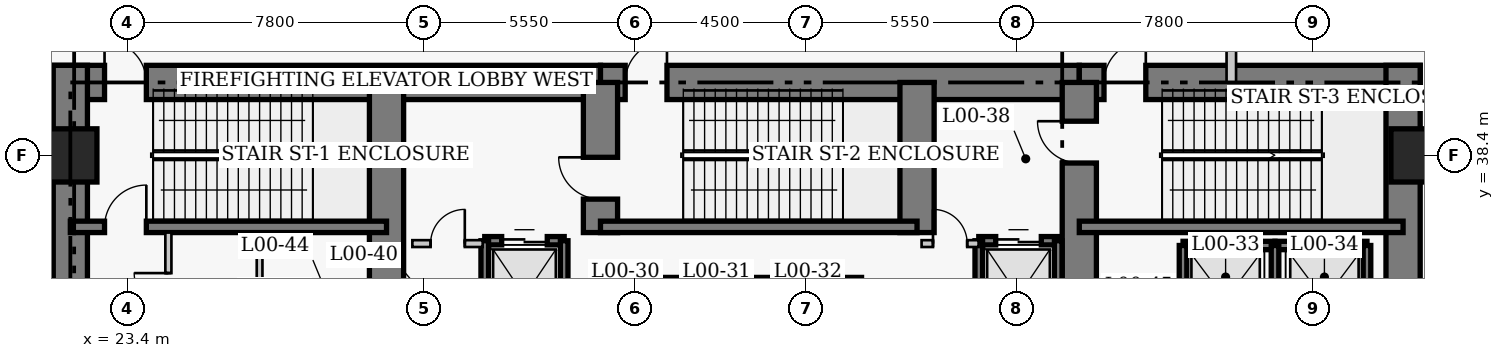
"""IFC4 building model, lengths in metres.
Left out: names, types, materials, properties, quantities, classifications, styles, units other than length and angle.
Written with IfcOpenShell. Run it as: python <this file> out.ifc"""

import sys

from ifc_helpers import new_model, si_unit, direction, frame, frame_2d, origin, origin_2d, place, context, subcontext, project, spatial, rectangle, extrude, element, fill, save


model = new_model("IFC4")
c1 = context("Model", 3, precision=1e-05, world=origin(), true_north=direction((0.0, 1.0)))
c2 = subcontext(c1, "Body", "Model", "MODEL_VIEW")
j1 = project(units=[si_unit("LENGTHUNIT", "METRE"), si_unit("PLANEANGLEUNIT", "RADIAN")], contexts=[c1])
p1 = place(None, origin())
s1 = spatial("IfcSite", under=j1, at=p1, CompositionType="ELEMENT")
p2 = place(p1, origin())
s2 = spatial("IfcBuilding", under=s1, at=p2, CompositionType="ELEMENT")
p3 = place(p2, origin())
s3 = spatial("IfcBuildingStorey", under=s2, at=p3, CompositionType="ELEMENT", Elevation=0.0)
p4 = place(p3, frame((21.45, 40.32, 0.0), z_axis=(0.0, 0.0, 1.0), x_axis=(1.0, 0.0, 0.0)))
e1 = element("IfcWall", 1, at=p4, inside=s3, PredefinedType="SHEAR", context=c2, shape_type="SweptSolid", body=[
    extrude(rectangle(XDim=14.4, YDim=0.9, at=frame_2d((7.2, 0.0))), origin(), (0.0, 0.0, 1.0), 5.4),
])
p5 = place(p4, frame((1.35, 0.0, 0.0)))
e2 = element("IfcOpeningElement", 2, at=p5, cuts=e1, PredefinedType="OPENING", context=c2, shape_type="SweptSolid", body=[
    extrude(rectangle(XDim=1.1, YDim=2.15, at=frame_2d((0.55, 1.075))), frame((0.0, 0.46, 0.0), z_axis=(0.0, -1.0, 0.0), x_axis=(1.0, 0.0, 0.0)), (0.0, 0.0, 1.0), 0.92),
])
p6 = place(p3, frame((35.85, 40.32, 0.0), z_axis=(0.0, 0.0, 1.0), x_axis=(1.0, 0.0, 0.0)))
e3 = element("IfcWall", 3, at=p6, inside=s3, PredefinedType="SHEAR", context=c2, shape_type="SweptSolid", body=[
    extrude(rectangle(XDim=12.6, YDim=0.9, at=frame_2d((6.3, 0.0))), origin(), (0.0, 0.0, 1.0), 5.4),
])
p7 = place(p6, frame((0.65, 0.0, 0.0)))
e4 = element("IfcOpeningElement", 4, at=p7, cuts=e3, PredefinedType="OPENING", context=c2, shape_type="SweptSolid", body=[
    extrude(rectangle(XDim=1.1, YDim=2.15, at=frame_2d((0.55, 1.075))), frame((0.0, 0.46, 0.0), z_axis=(0.0, -1.0, 0.0), x_axis=(1.0, 0.0, 0.0)), (0.0, 0.0, 1.0), 0.92),
])
p8 = place(p3, frame((48.45, 40.32, 0.0), z_axis=(0.0, 0.0, 1.0), x_axis=(1.0, 0.0, 0.0)))
e5 = element("IfcWall", 5, at=p8, inside=s3, PredefinedType="SHEAR", context=c2, shape_type="SweptSolid", body=[
    extrude(rectangle(XDim=8.97, YDim=0.9, at=frame_2d((4.485, 0.0))), origin(), (0.0, 0.0, 1.0), 5.4),
])
p9 = place(p8, frame((0.65, 0.0, 0.0)))
e6 = element("IfcOpeningElement", 6, at=p9, cuts=e5, PredefinedType="OPENING", context=c2, shape_type="SweptSolid", body=[
    extrude(rectangle(XDim=1.1, YDim=2.15, at=frame_2d((0.55, 1.075))), frame((0.0, 0.46, 0.0), z_axis=(0.0, -1.0, 0.0), x_axis=(1.0, 0.0, 0.0)), (0.0, 0.0, 1.0), 0.92),
])
for number, where, z_axis, x_axis in (
    (7, (21.9, 27.05, 0.0), (0.0, 0.0, 1.0), (0.0, 1.0, 0.0)),
    (8, (56.97, 27.05, 0.0), (0.0, 0.0, 1.0), (0.0, 1.0, 0.0)),
):
    element("IfcWall", number, at=place(p3, frame(where, z_axis=z_axis, x_axis=x_axis)), inside=s3, PredefinedType="SHEAR", context=c2, shape_type="SweptSolid", body=[
        extrude(rectangle(XDim=13.72, YDim=0.9, at=frame_2d((6.86, 0.0))), origin(), (0.0, 0.0, 1.0), 5.4),
    ])
p10 = place(p3, frame((30.22, 33.2, 0.0), z_axis=(0.0, 0.0, 1.0), x_axis=(0.0, 1.0, 0.0)))
e9 = element("IfcWall", 9, at=p10, inside=s3, PredefinedType="SHEAR", context=c2, shape_type="SweptSolid", body=[
    extrude(rectangle(XDim=7.12, YDim=0.9, at=frame_2d((3.56, 0.0))), origin(), (0.0, 0.0, 1.0), 5.4),
])
p11 = place(p3, frame((35.85, 36.37, 0.0), z_axis=(0.0, 0.0, 1.0), x_axis=(0.0, 1.0, 0.0)))
e10 = element("IfcWall", 10, at=p11, inside=s3, PredefinedType="SHEAR", context=c2, shape_type="SweptSolid", body=[
    extrude(rectangle(XDim=3.95, YDim=0.9, at=frame_2d((1.975, 0.0))), origin(), (0.0, 0.0, 1.0), 5.4),
])
p12 = place(p11, frame((0.88, 0.0, 0.0)))
e11 = element("IfcOpeningElement", 11, at=p12, cuts=e10, PredefinedType="OPENING", context=c2, shape_type="SweptSolid", body=[
    extrude(rectangle(XDim=1.1, YDim=2.15, at=frame_2d((0.55, 1.075))), frame((0.0, 0.46, 0.0), z_axis=(0.0, -1.0, 0.0), x_axis=(1.0, 0.0, 0.0)), (0.0, 0.0, 1.0), 0.92),
])
p13 = place(p3, frame((44.18, 36.37, 0.0), z_axis=(0.0, 0.0, 1.0), x_axis=(0.0, 1.0, 0.0)))
e12 = element("IfcWall", 12, at=p13, inside=s3, PredefinedType="SHEAR", context=c2, shape_type="SweptSolid", body=[
    extrude(rectangle(XDim=3.95, YDim=0.9, at=frame_2d((1.975, 0.0))), origin(), (0.0, 0.0, 1.0), 5.4),
])
p14 = place(p3, frame((48.45, 32.3, 0.0), z_axis=(0.0, 0.0, 1.0), x_axis=(0.0, 1.0, 0.0)))
e13 = element("IfcWall", 13, at=p14, inside=s3, PredefinedType="SHEAR", context=c2, shape_type="SweptSolid", body=[
    extrude(rectangle(XDim=8.02, YDim=0.9, at=frame_2d((4.01, 0.0))), origin(), (0.0, 0.0, 1.0), 5.4),
])
p15 = place(p14, frame((5.9, 0.0, 0.0)))
e14 = element("IfcOpeningElement", 14, at=p15, cuts=e13, PredefinedType="OPENING", context=c2, shape_type="SweptSolid", body=[
    extrude(rectangle(XDim=1.1, YDim=2.15, at=frame_2d((0.55, 1.075))), frame((0.0, 0.46, 0.0), z_axis=(0.0, -1.0, 0.0), x_axis=(1.0, 0.0, 0.0)), (0.0, 0.0, 1.0), 0.92),
])
p16 = place(p3, frame((21.9, 36.52, 0.0), z_axis=(0.0, 0.0, 1.0), x_axis=(1.0, 0.0, 0.0)))
e15 = element("IfcWall", 15, at=p16, inside=s3, PredefinedType="SHEAR", context=c2, shape_type="SweptSolid", body=[
    extrude(rectangle(XDim=8.32, YDim=0.3, at=frame_2d((4.16, 0.0))), origin(), (0.0, 0.0, 1.0), 5.4),
])
p17 = place(p16, frame((0.9, 0.0, 0.0)))
e16 = element("IfcOpeningElement", 16, at=p17, cuts=e15, PredefinedType="OPENING", context=c2, shape_type="SweptSolid", body=[
    extrude(rectangle(XDim=1.1, YDim=2.15, at=frame_2d((0.55, 1.075))), frame((0.0, 0.16, 0.0), z_axis=(0.0, -1.0, 0.0), x_axis=(1.0, 0.0, 0.0)), (0.0, 0.0, 1.0), 0.32),
])
p18 = place(p3, frame((35.85, 36.52, 0.0), z_axis=(0.0, 0.0, 1.0), x_axis=(1.0, 0.0, 0.0)))
e17 = element("IfcWall", 17, at=p18, inside=s3, PredefinedType="SHEAR", context=c2, shape_type="SweptSolid", body=[
    extrude(rectangle(XDim=8.33, YDim=0.3, at=frame_2d((4.165, 0.0))), origin(), (0.0, 0.0, 1.0), 5.4),
])
p19 = place(p3, frame((48.45, 36.52, 0.0), z_axis=(0.0, 0.0, 1.0), x_axis=(1.0, 0.0, 0.0)))
e18 = element("IfcWall", 18, at=p19, inside=s3, PredefinedType="SHEAR", context=c2, shape_type="SweptSolid", body=[
    extrude(rectangle(XDim=8.52, YDim=0.3, at=frame_2d((4.26, 0.0))), origin(), (0.0, 0.0, 1.0), 5.4),
])
for number, where, z_axis, x_axis in (
    (19, (21.9, 38.4, 0.0), (0.0, 0.0, 1.0), (1.0, 0.0, 0.0)),
    (20, (57.35, 38.4, 0.0), (0.0, 0.0, 1.0), (1.0, 0.0, 0.0)),
):
    element("IfcColumn", number, at=place(p3, frame(where, z_axis=z_axis, x_axis=x_axis)), inside=s3, PredefinedType="COLUMN", context=c2, shape_type="SweptSolid", body=[
        extrude(rectangle(XDim=1.4, YDim=1.4, at=origin_2d()), origin(), (0.0, 0.0, 1.0), 5.4),
    ])
p20 = place(p3, frame((35.68, 35.08, 0.0), z_axis=(0.0, 0.0, 1.0), x_axis=(1.0, 0.0, 0.0)))
e21 = element("IfcWall", 21, at=p20, inside=s3, PredefinedType="SHEAR", context=c2, shape_type="SweptSolid", body=[
    extrude(rectangle(XDim=2.32, YDim=0.22, at=frame_2d((1.16, 0.0))), origin(), (0.0, 0.0, 1.0), 5.4),
])
p21 = place(p3, frame((38.0, 35.08, 0.0), z_axis=(0.0, 0.0, 1.0), x_axis=(1.0, 0.0, 0.0)))
e22 = element("IfcWall", 22, at=p21, inside=s3, PredefinedType="SHEAR", context=c2, shape_type="SweptSolid", body=[
    extrude(rectangle(XDim=2.4, YDim=0.22, at=frame_2d((1.2, 0.0))), origin(), (0.0, 0.0, 1.0), 5.4),
])
p22 = place(p3, frame((40.4, 35.08, 0.0), z_axis=(0.0, 0.0, 1.0), x_axis=(1.0, 0.0, 0.0)))
e23 = element("IfcWall", 23, at=p22, inside=s3, PredefinedType="SHEAR", context=c2, shape_type="SweptSolid", body=[
    extrude(rectangle(XDim=2.32, YDim=0.22, at=frame_2d((1.16, 0.0))), origin(), (0.0, 0.0, 1.0), 5.4),
])
p23 = place(p3, frame((51.18, 36.03, 0.0), z_axis=(0.0, 0.0, 1.0), x_axis=(1.0, 0.0, 0.0)))
e24 = element("IfcWall", 24, at=p23, inside=s3, PredefinedType="SHEAR", context=c2, shape_type="SweptSolid", body=[
    extrude(rectangle(XDim=2.42, YDim=0.22, at=frame_2d((1.21, 0.0))), origin(), (0.0, 0.0, 1.0), 5.4),
])
p24 = place(p3, frame((51.18, 33.17, 0.0), z_axis=(0.0, 0.0, 1.0), x_axis=(0.0, 1.0, 0.0)))
e25 = element("IfcWall", 25, at=p24, inside=s3, PredefinedType="SHEAR", context=c2, shape_type="SweptSolid", body=[
    extrude(rectangle(XDim=2.86, YDim=0.2, at=frame_2d((1.43, 0.0))), origin(), (0.0, 0.0, 1.0), 5.4),
])
p25 = place(p3, frame((53.6, 36.03, 0.0), z_axis=(0.0, 0.0, 1.0), x_axis=(1.0, 0.0, 0.0)))
e26 = element("IfcWall", 26, at=p25, inside=s3, PredefinedType="SHEAR", context=c2, shape_type="SweptSolid", body=[
    extrude(rectangle(XDim=2.42, YDim=0.22, at=frame_2d((1.21, 0.0))), origin(), (0.0, 0.0, 1.0), 5.4),
])
for number, where, z_axis, x_axis in (
    (27, (53.6, 33.17, 0.0), (0.0, 0.0, 1.0), (0.0, 1.0, 0.0)),
    (28, (56.02, 33.17, 0.0), (0.0, 0.0, 1.0), (0.0, 1.0, 0.0)),
):
    element("IfcWall", number, at=place(p3, frame(where, z_axis=z_axis, x_axis=x_axis)), inside=s3, PredefinedType="SHEAR", context=c2, shape_type="SweptSolid", body=[
        extrude(rectangle(XDim=2.86, YDim=0.2, at=frame_2d((1.43, 0.0))), origin(), (0.0, 0.0, 1.0), 5.4),
    ])
p26 = place(p3, frame((32.805, 36.155, 0.0), z_axis=(0.0, 0.0, 1.0), x_axis=(1.0, 0.0, 0.0)))
e29 = element("IfcWall", 29, at=p26, inside=s3, PredefinedType="SHEAR", context=c2, shape_type="SweptSolid", body=[
    extrude(rectangle(XDim=2.09, YDim=0.22, at=frame_2d((1.045, 0.0))), origin(), (0.0, 0.0, 1.0), 5.4),
])
p27 = place(p26, frame((0.445, 0.0, 0.0)))
e30 = element("IfcOpeningElement", 30, at=p27, cuts=e29, PredefinedType="OPENING", context=c2, shape_type="SweptSolid", body=[
    extrude(rectangle(XDim=1.2, YDim=2.15, at=frame_2d((0.6, 1.075))), frame((0.0, 0.12, 0.0), z_axis=(0.0, -1.0, 0.0), x_axis=(1.0, 0.0, 0.0)), (0.0, 0.0, 1.0), 0.24),
])
for number, where, z_axis, x_axis in (
    (31, (32.805, 33.245, 0.0), (0.0, 0.0, 1.0), (0.0, 1.0, 0.0)),
    (32, (34.895, 33.245, 0.0), (0.0, 0.0, 1.0), (0.0, 1.0, 0.0)),
):
    element("IfcWall", number, at=place(p3, frame(where, z_axis=z_axis, x_axis=x_axis)), inside=s3, PredefinedType="SHEAR", context=c2, shape_type="SweptSolid", body=[
        extrude(rectangle(XDim=2.91, YDim=0.2, at=frame_2d((1.455, 0.0))), origin(), (0.0, 0.0, 1.0), 5.4),
    ])
p28 = place(p3, frame((45.805, 36.155, 0.0), z_axis=(0.0, 0.0, 1.0), x_axis=(1.0, 0.0, 0.0)))
e33 = element("IfcWall", 33, at=p28, inside=s3, PredefinedType="SHEAR", context=c2, shape_type="SweptSolid", body=[
    extrude(rectangle(XDim=2.09, YDim=0.22, at=frame_2d((1.045, 0.0))), origin(), (0.0, 0.0, 1.0), 5.4),
])
p29 = place(p28, frame((0.445, 0.0, 0.0)))
e34 = element("IfcOpeningElement", 34, at=p29, cuts=e33, PredefinedType="OPENING", context=c2, shape_type="SweptSolid", body=[
    extrude(rectangle(XDim=1.2, YDim=2.15, at=frame_2d((0.6, 1.075))), frame((0.0, 0.12, 0.0), z_axis=(0.0, -1.0, 0.0), x_axis=(1.0, 0.0, 0.0)), (0.0, 0.0, 1.0), 0.24),
])
p30 = place(p3, frame((45.805, 32.65, 0.0), z_axis=(0.0, 0.0, 1.0), x_axis=(0.0, 1.0, 0.0)))
e35 = element("IfcWall", 35, at=p30, inside=s3, PredefinedType="SHEAR", context=c2, shape_type="SweptSolid", body=[
    extrude(rectangle(XDim=3.505, YDim=0.2, at=frame_2d((1.752, 0.0))), origin(), (0.0, 0.0, 1.0), 5.4),
])
p31 = place(p3, frame((47.895, 33.245, 0.0), z_axis=(0.0, 0.0, 1.0), x_axis=(0.0, 1.0, 0.0)))
e36 = element("IfcWall", 36, at=p31, inside=s3, PredefinedType="SHEAR", context=c2, shape_type="SweptSolid", body=[
    extrude(rectangle(XDim=2.91, YDim=0.2, at=frame_2d((1.455, 0.0))), origin(), (0.0, 0.0, 1.0), 5.4),
])
p32 = place(p3, frame((30.9, 36.08, 0.0), z_axis=(0.0, 0.0, 1.0), x_axis=(1.0, 0.0, 0.0)))
e37 = element("IfcWall", 37, at=p32, inside=s3, PredefinedType="PARTITIONING", context=c2, shape_type="SweptSolid", body=[
    extrude(rectangle(XDim=1.85, YDim=0.18, at=frame_2d((0.925, 0.0))), origin(), (0.0, 0.0, 1.0), 5.1),
])
p33 = place(p32, frame((0.48, 0.0, 0.0)))
e38 = element("IfcOpeningElement", 38, at=p33, cuts=e37, PredefinedType="OPENING", context=c2, shape_type="SweptSolid", body=[
    extrude(rectangle(XDim=0.9, YDim=2.15, at=frame_2d((0.45, 1.075))), frame((0.0, 0.1, 0.0), z_axis=(0.0, -1.0, 0.0), x_axis=(1.0, 0.0, 0.0)), (0.0, 0.0, 1.0), 0.2),
])
p34 = place(p3, frame((44.3, 36.08, 0.0), z_axis=(0.0, 0.0, 1.0), x_axis=(1.0, 0.0, 0.0)))
e39 = element("IfcWall", 39, at=p34, inside=s3, PredefinedType="PARTITIONING", context=c2, shape_type="SweptSolid", body=[
    extrude(rectangle(XDim=1.5, YDim=0.18, at=frame_2d((0.75, 0.0))), origin(), (0.0, 0.0, 1.0), 5.1),
])
p35 = place(p34, frame((0.3, 0.0, 0.0)))
e40 = element("IfcOpeningElement", 40, at=p35, cuts=e39, PredefinedType="OPENING", context=c2, shape_type="SweptSolid", body=[
    extrude(rectangle(XDim=0.9, YDim=2.15, at=frame_2d((0.45, 1.075))), frame((0.0, 0.1, 0.0), z_axis=(0.0, -1.0, 0.0), x_axis=(1.0, 0.0, 0.0)), (0.0, 0.0, 1.0), 0.2),
])
p36 = place(p3, frame((24.48, 32.8, 0.0), z_axis=(0.0, 0.0, 1.0), x_axis=(0.0, 1.0, 0.0)))
e41 = element("IfcWall", 41, at=p36, inside=s3, PredefinedType="PARTITIONING", context=c2, shape_type="SweptSolid", body=[
    extrude(rectangle(XDim=3.57, YDim=0.16, at=frame_2d((1.785, 0.0))), origin(), (0.0, 0.0, 1.0), 5.1),
])
p37 = place(p36, frame((1.604, 0.0, 0.0)))
e42 = element("IfcOpeningElement", 42, at=p37, cuts=e41, PredefinedType="OPENING", context=c2, shape_type="SweptSolid", body=[
    extrude(rectangle(XDim=0.9, YDim=2.1, at=frame_2d((0.45, 1.05))), frame((0.0, 0.09, 0.0), z_axis=(0.0, -1.0, 0.0), x_axis=(1.0, 0.0, 0.0)), (0.0, 0.0, 1.0), 0.18),
])
p38 = place(p3, frame((26.88, 32.75, 0.0), z_axis=(0.0, 0.0, 1.0), x_axis=(0.0, 1.0, 0.0)))
e43 = element("IfcWall", 43, at=p38, inside=s3, PredefinedType="PARTITIONING", context=c2, shape_type="SweptSolid", body=[
    extrude(rectangle(XDim=3.62, YDim=0.15, at=frame_2d((1.81, 0.0))), origin(), (0.0, 0.0, 1.0), 5.1),
])
p39 = place(p3, frame((52.45, 40.32, 0.0), z_axis=(0.0, 0.0, 1.0), x_axis=(0.0, 1.0, 0.0)))
e44 = element("IfcWall", 44, at=p39, inside=s3, PredefinedType="SOLIDWALL", context=c2, shape_type="SweptSolid", body=[
    extrude(rectangle(XDim=11.26, YDim=0.25, at=frame_2d((5.63, 0.0))), origin(), (0.0, 0.0, 1.0), 5.1),
])
p40 = place(p27, origin())
e45 = element("IfcDoor", 45, at=p40, inside=s3, OperationType="DOUBLE_DOOR_SLIDING", PredefinedType="DOOR", context=c2, shape_type="SweptSolid", body=[
    extrude(rectangle(XDim=1.2, YDim=2.15, at=frame_2d((0.6, 1.075))), frame((0.0, 0.025, 0.0), z_axis=(0.0, -1.0, 0.0), x_axis=(1.0, 0.0, 0.0)), (0.0, 0.0, 1.0), 0.05),
])
fill(e30, e45)
p41 = place(p29, origin())
e46 = element("IfcDoor", 46, at=p41, inside=s3, OperationType="DOUBLE_DOOR_SLIDING", PredefinedType="DOOR", context=c2, shape_type="SweptSolid", body=[
    extrude(rectangle(XDim=1.2, YDim=2.15, at=frame_2d((0.6, 1.075))), frame((0.0, 0.025, 0.0), z_axis=(0.0, -1.0, 0.0), x_axis=(1.0, 0.0, 0.0)), (0.0, 0.0, 1.0), 0.05),
])
fill(e34, e46)
p42 = place(p33, origin())
e47 = element("IfcDoor", 47, at=p42, inside=s3, OperationType="SINGLE_SWING_RIGHT", PredefinedType="DOOR", context=c2, shape_type="SweptSolid", body=[
    extrude(rectangle(XDim=0.9, YDim=2.15, at=frame_2d((0.45, 1.075))), frame((0.0, 0.025, 0.0), z_axis=(0.0, -1.0, 0.0), x_axis=(1.0, 0.0, 0.0)), (0.0, 0.0, 1.0), 0.05),
])
fill(e38, e47)
p43 = place(p35, origin())
e48 = element("IfcDoor", 48, at=p43, inside=s3, OperationType="SINGLE_SWING_LEFT", PredefinedType="DOOR", context=c2, shape_type="SweptSolid", body=[
    extrude(rectangle(XDim=0.9, YDim=2.15, at=frame_2d((0.45, 1.075))), frame((0.0, 0.025, 0.0), z_axis=(0.0, -1.0, 0.0), x_axis=(1.0, 0.0, 0.0)), (0.0, 0.0, 1.0), 0.05),
])
fill(e40, e48)
p44 = place(p37, origin())
e49 = element("IfcDoor", 49, at=p44, inside=s3, OperationType="SINGLE_SWING_RIGHT", PredefinedType="DOOR", context=c2, shape_type="SweptSolid", body=[
    extrude(rectangle(XDim=0.9, YDim=2.1, at=frame_2d((0.45, 1.05))), frame((0.0, 0.025, 0.0), z_axis=(0.0, -1.0, 0.0), x_axis=(1.0, 0.0, 0.0)), (0.0, 0.0, 1.0), 0.05),
])
fill(e42, e49)
p45 = place(p17, origin())
e50 = element("IfcDoor", 50, at=p45, inside=s3, OperationType="SINGLE_SWING_RIGHT", PredefinedType="DOOR", context=c2, shape_type="SweptSolid", body=[
    extrude(rectangle(XDim=1.1, YDim=2.15, at=frame_2d((0.55, 1.075))), frame((0.0, 0.025, 0.0), z_axis=(0.0, -1.0, 0.0), x_axis=(1.0, 0.0, 0.0)), (0.0, 0.0, 1.0), 0.05),
])
fill(e16, e50)
p46 = place(p12, origin())
e51 = element("IfcDoor", 51, at=p46, inside=s3, OperationType="SINGLE_SWING_RIGHT", PredefinedType="DOOR", context=c2, shape_type="SweptSolid", body=[
    extrude(rectangle(XDim=1.1, YDim=2.15, at=frame_2d((0.55, 1.075))), frame((0.0, 0.025, 0.0), z_axis=(0.0, -1.0, 0.0), x_axis=(1.0, 0.0, 0.0)), (0.0, 0.0, 1.0), 0.05),
])
fill(e11, e51)
p47 = place(p15, origin())
e52 = element("IfcDoor", 52, at=p47, inside=s3, OperationType="SINGLE_SWING_RIGHT", PredefinedType="DOOR", context=c2, shape_type="SweptSolid", body=[
    extrude(rectangle(XDim=1.1, YDim=2.15, at=frame_2d((0.55, 1.075))), frame((0.0, 0.025, 0.0), z_axis=(0.0, -1.0, 0.0), x_axis=(1.0, 0.0, 0.0)), (0.0, 0.0, 1.0), 0.05),
])
fill(e14, e52)
p48 = place(p5, origin())
e53 = element("IfcDoor", 53, at=p48, inside=s3, OperationType="SINGLE_SWING_LEFT", PredefinedType="DOOR", context=c2, shape_type="SweptSolid", body=[
    extrude(rectangle(XDim=1.1, YDim=2.15, at=frame_2d((0.55, 1.075))), frame((0.0, 0.025, 0.0), z_axis=(0.0, -1.0, 0.0), x_axis=(1.0, 0.0, 0.0)), (0.0, 0.0, 1.0), 0.05),
])
fill(e2, e53)
p49 = place(p7, origin())
e54 = element("IfcDoor", 54, at=p49, inside=s3, OperationType="SINGLE_SWING_RIGHT", PredefinedType="DOOR", context=c2, shape_type="SweptSolid", body=[
    extrude(rectangle(XDim=1.1, YDim=2.15, at=frame_2d((0.55, 1.075))), frame((0.0, 0.025, 0.0), z_axis=(0.0, -1.0, 0.0), x_axis=(1.0, 0.0, 0.0)), (0.0, 0.0, 1.0), 0.05),
])
fill(e4, e54)
p50 = place(p9, origin())
e55 = element("IfcDoor", 55, at=p50, inside=s3, OperationType="SINGLE_SWING_RIGHT", PredefinedType="DOOR", context=c2, shape_type="SweptSolid", body=[
    extrude(rectangle(XDim=1.1, YDim=2.15, at=frame_2d((0.55, 1.075))), frame((0.0, 0.025, 0.0), z_axis=(0.0, -1.0, 0.0), x_axis=(1.0, 0.0, 0.0)), (0.0, 0.0, 1.0), 0.05),
])
fill(e6, e55)
save(model, sys.argv[1])
